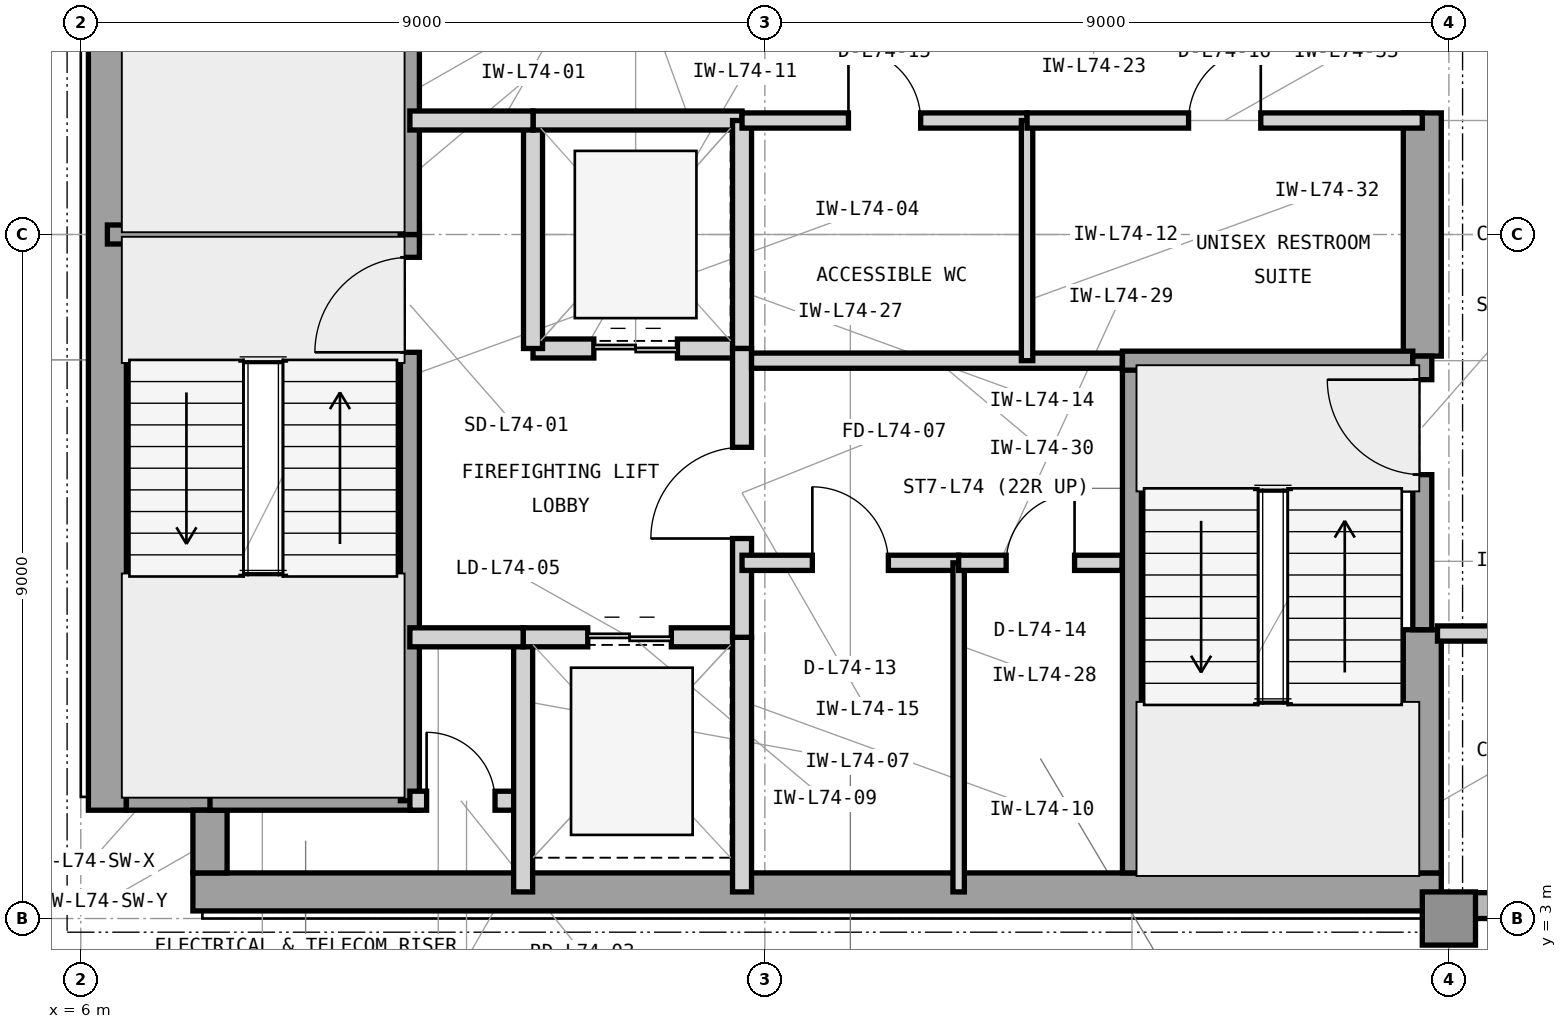
"""IFC4 building model, lengths in metres.
Left out: names, types, materials, properties, quantities, classifications, styles, units other than length and angle.
Written with IfcOpenShell. Run it as: python <this file> out.ifc"""

import sys

from ifc_helpers import new_model, si_unit, direction, frame, frame_2d, origin, origin_2d, place, context, subcontext, project, spatial, rectangle, extrude, element, fill, save


model = new_model("IFC4")
c1 = context("Model", 3, precision=1e-05, world=origin(), true_north=direction((0.0, 1.0)))
c2 = subcontext(c1, "Body", "Model", "MODEL_VIEW")
j1 = project(units=[si_unit("LENGTHUNIT", "METRE"), si_unit("PLANEANGLEUNIT", "RADIAN")], contexts=[c1])
p1 = place(None, origin())
s1 = spatial("IfcSite", under=j1, at=p1, CompositionType="ELEMENT")
p2 = place(p1, origin())
s2 = spatial("IfcBuilding", under=s1, at=p2, CompositionType="ELEMENT")
p3 = place(p2, frame((0.0, 0.0, 301.5)))
s3 = spatial("IfcBuildingStorey", under=s2, at=p3, CompositionType="ELEMENT", Elevation=301.5)
p4 = place(p3, frame((7.475, 3.35, 0.0), z_axis=(0.0, 0.0, 1.0), x_axis=(1.0, 0.0, 0.0)))
e1 = element("IfcWall", 1, at=p4, inside=s3, PredefinedType="SHEAR", context=c2, shape_type="SweptSolid", body=[
    extrude(rectangle(XDim=16.425, YDim=0.5, at=frame_2d((8.212, 0.0))), origin(), (0.0, 0.0, 1.0), 3.9),
])
p5 = place(p3, frame((6.35, 4.425, 0.0), z_axis=(0.0, 0.0, 1.0), x_axis=(0.0, 1.0, 0.0)))
e2 = element("IfcWall", 2, at=p5, inside=s3, PredefinedType="SHEAR", context=c2, shape_type="SweptSolid", body=[
    extrude(rectangle(XDim=15.15, YDim=0.5, at=frame_2d((7.575, 0.0))), origin(), (0.0, 0.0, 1.0), 3.9),
])
p6 = place(p3, frame((23.65, 3.6, 0.0), z_axis=(0.0, 0.0, 1.0), x_axis=(0.0, 1.0, 0.0)))
e3 = element("IfcWall", 3, at=p6, inside=s3, PredefinedType="SHEAR", context=c2, shape_type="SweptSolid", body=[
    extrude(rectangle(XDim=3.2, YDim=0.5, at=frame_2d((1.6, 0.0))), origin(), (0.0, 0.0, 1.0), 3.9),
])
p7 = place(p3, frame((23.65, 10.4, 0.0), z_axis=(0.0, 0.0, 1.0), x_axis=(0.0, 1.0, 0.0)))
e4 = element("IfcWall", 4, at=p7, inside=s3, PredefinedType="SHEAR", context=c2, shape_type="SweptSolid", body=[
    extrude(rectangle(XDim=3.2, YDim=0.5, at=frame_2d((1.6, 0.0))), origin(), (0.0, 0.0, 1.0), 3.9),
])
p8 = place(p3, frame((6.6, 4.65, 0.0), z_axis=(0.0, 0.0, 1.0), x_axis=(1.0, 0.0, 0.0)))
e5 = element("IfcWall", 5, at=p8, inside=s3, PredefinedType="SHEAR", context=c2, shape_type="SweptSolid", body=[
    extrude(rectangle(XDim=1.325, YDim=0.45, at=frame_2d((0.663, 0.0))), origin(), (0.0, 0.0, 1.0), 3.9),
])
p9 = place(p3, frame((7.7, 3.6, 0.0), z_axis=(0.0, 0.0, 1.0), x_axis=(0.0, 1.0, 0.0)))
e6 = element("IfcWall", 6, at=p9, inside=s3, PredefinedType="SHEAR", context=c2, shape_type="SweptSolid", body=[
    extrude(rectangle(XDim=0.825, YDim=0.45, at=frame_2d((0.413, 0.0))), origin(), (0.0, 0.0, 1.0), 3.9),
])
p10 = place(p3, frame((24.0, 3.0, 0.0), z_axis=(0.0, 0.0, 1.0), x_axis=(1.0, 0.0, 0.0)))
e7 = element("IfcColumn", 7, at=p10, inside=s3, PredefinedType="COLUMN", context=c2, shape_type="SweptSolid", body=[
    extrude(rectangle(XDim=0.7, YDim=0.7, at=origin_2d()), origin(), (0.0, 0.0, 1.0), 3.9),
])
p11 = place(p3, frame((23.9, 3.17, 0.0), z_axis=(0.0, 0.0, 1.0), x_axis=(1.0, 0.0, 0.0)))
e8 = element("IfcWall", 8, at=p11, inside=s3, PredefinedType="STANDARD", context=c2, shape_type="SweptSolid", body=[
    extrude(rectangle(XDim=25.5, YDim=0.34, at=frame_2d((12.75, 0.0))), origin(), (0.0, 0.0, 1.0), 3.715),
])
p12 = place(p11, frame((0.8, 0.0, 0.8)))
e9 = element("IfcOpeningElement", 9, at=p12, cuts=e8, PredefinedType="OPENING", context=c2, shape_type="SweptSolid", body=[
    extrude(rectangle(XDim=1.9, YDim=2.35, at=frame_2d((0.95, 1.175))), frame((0.0, 0.18, 0.0), z_axis=(0.0, -1.0, 0.0), x_axis=(1.0, 0.0, 0.0)), (0.0, 0.0, 1.0), 0.36),
])
p13 = place(p11, frame((10.075, 0.0, 0.8)))
e10 = element("IfcOpeningElement", 10, at=p13, cuts=e8, PredefinedType="OPENING", context=c2, shape_type="SweptSolid", body=[
    extrude(rectangle(XDim=2.6, YDim=2.35, at=frame_2d((1.3, 1.175))), frame((0.0, 0.18, 0.0), z_axis=(0.0, -1.0, 0.0), x_axis=(1.0, 0.0, 0.0)), (0.0, 0.0, 1.0), 0.36),
])
p14 = place(p11, frame((14.525, 0.0, 0.8)))
e11 = element("IfcOpeningElement", 11, at=p14, cuts=e8, PredefinedType="OPENING", context=c2, shape_type="SweptSolid", body=[
    extrude(rectangle(XDim=2.6, YDim=2.35, at=frame_2d((1.3, 1.175))), frame((0.0, 0.18, 0.0), z_axis=(0.0, -1.0, 0.0), x_axis=(1.0, 0.0, 0.0)), (0.0, 0.0, 1.0), 0.36),
])
p15 = place(p3, frame((6.35, 12.0, 0.0), z_axis=(0.0, 0.0, 1.0), x_axis=(1.0, 0.0, 0.0)))
e12 = element("IfcWall", 12, at=p15, inside=s3, PredefinedType="SHEAR", context=c2, shape_type="SweptSolid", body=[
    extrude(rectangle(XDim=4.105, YDim=0.25, at=frame_2d((2.052, 0.0))), origin(), (0.0, 0.0, 1.0), 3.9),
])
p16 = place(p3, frame((7.7, 4.55, 0.0), z_axis=(0.0, 0.0, 1.0), x_axis=(1.0, 0.0, 0.0)))
e13 = element("IfcWall", 13, at=p16, inside=s3, PredefinedType="SHEAR", context=c2, shape_type="SweptSolid", body=[
    extrude(rectangle(XDim=2.755, YDim=0.25, at=frame_2d((1.377, 0.0))), origin(), (0.0, 0.0, 1.0), 3.9),
])
p17 = place(p3, frame((10.33, 4.55, 0.0), z_axis=(0.0, 0.0, 1.0), x_axis=(0.0, 1.0, 0.0)))
e14 = element("IfcWall", 14, at=p17, inside=s3, PredefinedType="SHEAR", context=c2, shape_type="SweptSolid", body=[
    extrude(rectangle(XDim=7.45, YDim=0.25, at=frame_2d((3.725, 0.0))), origin(), (0.0, 0.0, 1.0), 3.9),
])
p18 = place(p17, frame((5.9, 0.0, 0.0)))
e15 = element("IfcOpeningElement", 15, at=p18, cuts=e14, PredefinedType="OPENING", context=c2, shape_type="SweptSolid", body=[
    extrude(rectangle(XDim=1.25, YDim=2.2, at=frame_2d((0.625, 1.1))), frame((0.0, 0.135, 0.0), z_axis=(0.0, -1.0, 0.0), x_axis=(1.0, 0.0, 0.0)), (0.0, 0.0, 1.0), 0.27),
])
p19 = place(p3, frame((10.33, 12.0, 0.0), z_axis=(0.0, 0.0, 1.0), x_axis=(0.0, 1.0, 0.0)))
e16 = element("IfcWall", 16, at=p19, inside=s3, PredefinedType="SHEAR", context=c2, shape_type="SweptSolid", body=[
    extrude(rectangle(XDim=7.45, YDim=0.25, at=frame_2d((3.725, 0.0))), origin(), (0.0, 0.0, 1.0), 3.9),
])
p20 = place(p19, frame((5.85, 0.0, 0.0)))
e17 = element("IfcOpeningElement", 17, at=p20, cuts=e16, PredefinedType="OPENING", context=c2, shape_type="SweptSolid", body=[
    extrude(rectangle(XDim=1.25, YDim=2.2, at=frame_2d((0.625, 1.1))), frame((0.0, 0.135, 0.0), z_axis=(0.0, -1.0, 0.0), x_axis=(1.0, 0.0, 0.0)), (0.0, 0.0, 1.0), 0.27),
])
p21 = place(p3, frame((10.33, 4.55, 0.0), z_axis=(0.0, 0.0, 1.0), x_axis=(1.0, 0.0, 0.0)))
e18 = element("IfcWall", 18, at=p21, inside=s3, PredefinedType="PARTITIONING", context=c2, shape_type="SweptSolid", body=[
    extrude(rectangle(XDim=1.49, YDim=0.25, at=frame_2d((0.745, 0.0))), origin(), (0.0, 0.0, 1.0), 3.705),
])
p22 = place(p21, frame((0.22, 0.0, 0.0)))
e19 = element("IfcOpeningElement", 19, at=p22, cuts=e18, PredefinedType="OPENING", context=c2, shape_type="SweptSolid", body=[
    extrude(rectangle(XDim=0.9, YDim=2.1, at=frame_2d((0.45, 1.05))), frame((0.0, 0.135, 0.0), z_axis=(0.0, -1.0, 0.0), x_axis=(1.0, 0.0, 0.0)), (0.0, 0.0, 1.0), 0.27),
])
p23 = place(p3, frame((11.82, 3.35, 0.0), z_axis=(0.0, 0.0, 1.0), x_axis=(0.0, 1.0, 0.0)))
e20 = element("IfcWall", 20, at=p23, inside=s3, PredefinedType="PARTITIONING", context=c2, shape_type="SweptSolid", body=[
    extrude(rectangle(XDim=3.35, YDim=0.25, at=frame_2d((1.675, 0.0))), origin(), (0.0, 0.0, 1.0), 3.705),
])
p24 = place(p3, frame((11.82, 6.7, 0.0), z_axis=(0.0, 0.0, 1.0), x_axis=(1.0, 0.0, 0.0)))
e21 = element("IfcWall", 21, at=p24, inside=s3, PredefinedType="PARTITIONING", context=c2, shape_type="SweptSolid", body=[
    extrude(rectangle(XDim=2.88, YDim=0.25, at=frame_2d((1.44, 0.0))), origin(), (0.0, 0.0, 1.0), 3.354),
])
p25 = place(p24, frame((0.85, 0.0, 0.0)))
e22 = element("IfcOpeningElement", 22, at=p25, cuts=e21, PredefinedType="OPENING", context=c2, shape_type="SweptSolid", body=[
    extrude(rectangle(XDim=1.1, YDim=2.25, at=frame_2d((0.55, 1.125))), frame((0.0, 0.135, 0.0), z_axis=(0.0, -1.0, 0.0), x_axis=(1.0, 0.0, 0.0)), (0.0, 0.0, 1.0), 0.27),
])
p26 = place(p3, frame((14.7, 3.35, 0.0), z_axis=(0.0, 0.0, 1.0), x_axis=(0.0, 1.0, 0.0)))
e23 = element("IfcWall", 23, at=p26, inside=s3, PredefinedType="PARTITIONING", context=c2, shape_type="SweptSolid", body=[
    extrude(rectangle(XDim=3.35, YDim=0.25, at=frame_2d((1.675, 0.0))), origin(), (0.0, 0.0, 1.0), 3.705),
])
p27 = place(p3, frame((11.95, 10.5, 0.0), z_axis=(0.0, 0.0, 1.0), x_axis=(1.0, 0.0, 0.0)))
e24 = element("IfcWall", 24, at=p27, inside=s3, PredefinedType="PARTITIONING", context=c2, shape_type="SweptSolid", body=[
    extrude(rectangle(XDim=2.75, YDim=0.25, at=frame_2d((1.375, 0.0))), origin(), (0.0, 0.0, 1.0), 3.354),
])
p28 = place(p27, frame((0.8, 0.0, 0.0)))
e25 = element("IfcOpeningElement", 25, at=p28, cuts=e24, PredefinedType="OPENING", context=c2, shape_type="SweptSolid", body=[
    extrude(rectangle(XDim=1.1, YDim=2.25, at=frame_2d((0.55, 1.125))), frame((0.0, 0.135, 0.0), z_axis=(0.0, -1.0, 0.0), x_axis=(1.0, 0.0, 0.0)), (0.0, 0.0, 1.0), 0.27),
])
p29 = place(p3, frame((11.95, 10.5, 0.0), z_axis=(0.0, 0.0, 1.0), x_axis=(0.0, 1.0, 0.0)))
e26 = element("IfcWall", 26, at=p29, inside=s3, PredefinedType="PARTITIONING", context=c2, shape_type="SweptSolid", body=[
    extrude(rectangle(XDim=3.0, YDim=0.25, at=frame_2d((1.5, 0.0))), origin(), (0.0, 0.0, 1.0), 3.705),
])
p30 = place(p3, frame((11.95, 13.5, 0.0), z_axis=(0.0, 0.0, 1.0), x_axis=(1.0, 0.0, 0.0)))
e27 = element("IfcWall", 27, at=p30, inside=s3, PredefinedType="PARTITIONING", context=c2, shape_type="SweptSolid", body=[
    extrude(rectangle(XDim=2.75, YDim=0.25, at=frame_2d((1.375, 0.0))), origin(), (0.0, 0.0, 1.0), 3.354),
])
p31 = place(p3, frame((14.7, 10.5, 0.0), z_axis=(0.0, 0.0, 1.0), x_axis=(0.0, 1.0, 0.0)))
e28 = element("IfcWall", 28, at=p31, inside=s3, PredefinedType="PARTITIONING", context=c2, shape_type="SweptSolid", body=[
    extrude(rectangle(XDim=3.0, YDim=0.25, at=frame_2d((1.5, 0.0))), origin(), (0.0, 0.0, 1.0), 3.705),
])
p32 = place(p3, frame((14.7, 6.7, 0.0), z_axis=(0.0, 0.0, 1.0), x_axis=(0.0, 1.0, 0.0)))
e29 = element("IfcWall", 29, at=p32, inside=s3, PredefinedType="PARTITIONING", context=c2, shape_type="SweptSolid", body=[
    extrude(rectangle(XDim=3.8, YDim=0.25, at=frame_2d((1.9, 0.0))), origin(), (0.0, 0.0, 1.0), 3.705),
])
p33 = place(p32, frame((1.3, 0.0, 0.0)))
e30 = element("IfcOpeningElement", 30, at=p33, cuts=e29, PredefinedType="OPENING", context=c2, shape_type="SweptSolid", body=[
    extrude(rectangle(XDim=1.2, YDim=2.2, at=frame_2d((0.6, 1.1))), frame((0.0, 0.135, 0.0), z_axis=(0.0, -1.0, 0.0), x_axis=(1.0, 0.0, 0.0)), (0.0, 0.0, 1.0), 0.27),
])
p34 = place(p3, frame((10.33, 13.5, 0.0), z_axis=(0.0, 0.0, 1.0), x_axis=(1.0, 0.0, 0.0)))
e31 = element("IfcWall", 31, at=p34, inside=s3, PredefinedType="PARTITIONING", context=c2, shape_type="SweptSolid", body=[
    extrude(rectangle(XDim=1.62, YDim=0.25, at=frame_2d((0.81, 0.0))), origin(), (0.0, 0.0, 1.0), 3.354),
])
p35 = place(p3, frame((10.33, 6.7, 0.0), z_axis=(0.0, 0.0, 1.0), x_axis=(1.0, 0.0, 0.0)))
e32 = element("IfcWall", 32, at=p35, inside=s3, PredefinedType="PARTITIONING", context=c2, shape_type="SweptSolid", body=[
    extrude(rectangle(XDim=1.49, YDim=0.25, at=frame_2d((0.745, 0.0))), origin(), (0.0, 0.0, 1.0), 3.354),
])
p36 = place(p3, frame((14.7, 7.68, 0.0), z_axis=(0.0, 0.0, 1.0), x_axis=(1.0, 0.0, 0.0)))
e33 = element("IfcWall", 33, at=p36, inside=s3, PredefinedType="PARTITIONING", context=c2, shape_type="SweptSolid", body=[
    extrude(rectangle(XDim=2.85, YDim=0.2, at=frame_2d((1.425, 0.0))), origin(), (0.0, 0.0, 1.0), 3.705),
])
p37 = place(p36, frame((0.925, 0.0, 0.0)))
e34 = element("IfcOpeningElement", 34, at=p37, cuts=e33, PredefinedType="OPENING", context=c2, shape_type="SweptSolid", body=[
    extrude(rectangle(XDim=1.0, YDim=2.15, at=frame_2d((0.5, 1.075))), frame((0.0, 0.11, 0.0), z_axis=(0.0, -1.0, 0.0), x_axis=(1.0, 0.0, 0.0)), (0.0, 0.0, 1.0), 0.22),
])
p38 = place(p3, frame((17.55, 3.35, 0.0), z_axis=(0.0, 0.0, 1.0), x_axis=(0.0, 1.0, 0.0)))
e35 = element("IfcWall", 35, at=p38, inside=s3, PredefinedType="PARTITIONING", context=c2, shape_type="SweptSolid", body=[
    extrude(rectangle(XDim=4.33, YDim=0.15, at=frame_2d((2.165, 0.0))), origin(), (0.0, 0.0, 1.0), 3.705),
])
p39 = place(p3, frame((17.55, 7.68, 0.0), z_axis=(0.0, 0.0, 1.0), x_axis=(1.0, 0.0, 0.0)))
e36 = element("IfcWall", 36, at=p39, inside=s3, PredefinedType="PARTITIONING", context=c2, shape_type="SweptSolid", body=[
    extrude(rectangle(XDim=2.15, YDim=0.2, at=frame_2d((1.075, 0.0))), origin(), (0.0, 0.0, 1.0), 3.705),
])
p40 = place(p39, frame((0.625, 0.0, 0.0)))
e37 = element("IfcOpeningElement", 37, at=p40, cuts=e36, PredefinedType="OPENING", context=c2, shape_type="SweptSolid", body=[
    extrude(rectangle(XDim=0.9, YDim=2.1, at=frame_2d((0.45, 1.05))), frame((0.0, 0.11, 0.0), z_axis=(0.0, -1.0, 0.0), x_axis=(1.0, 0.0, 0.0)), (0.0, 0.0, 1.0), 0.22),
])
p41 = place(p3, frame((14.825, 10.34, 0.0), z_axis=(0.0, 0.0, 1.0), x_axis=(1.0, 0.0, 0.0)))
e38 = element("IfcWall", 38, at=p41, inside=s3, PredefinedType="PARTITIONING", context=c2, shape_type="SweptSolid", body=[
    extrude(rectangle(XDim=4.88, YDim=0.2, at=frame_2d((2.44, 0.0))), origin(), (0.0, 0.0, 1.0), 3.705),
])
p42 = place(p3, frame((14.7, 13.5, 0.0), z_axis=(0.0, 0.0, 1.0), x_axis=(1.0, 0.0, 0.0)))
e39 = element("IfcWall", 39, at=p42, inside=s3, PredefinedType="PARTITIONING", context=c2, shape_type="SweptSolid", body=[
    extrude(rectangle(XDim=3.75, YDim=0.2, at=frame_2d((1.875, 0.0))), origin(), (0.0, 0.0, 1.0), 3.354),
])
p43 = place(p42, frame((1.4, 0.0, 0.0)))
e40 = element("IfcOpeningElement", 40, at=p43, cuts=e39, PredefinedType="OPENING", context=c2, shape_type="SweptSolid", body=[
    extrude(rectangle(XDim=0.95, YDim=2.1, at=frame_2d((0.475, 1.05))), frame((0.0, 0.11, 0.0), z_axis=(0.0, -1.0, 0.0), x_axis=(1.0, 0.0, 0.0)), (0.0, 0.0, 1.0), 0.22),
])
p44 = place(p3, frame((18.45, 10.34, 0.0), z_axis=(0.0, 0.0, 1.0), x_axis=(0.0, 1.0, 0.0)))
e41 = element("IfcWall", 41, at=p44, inside=s3, PredefinedType="PARTITIONING", context=c2, shape_type="SweptSolid", body=[
    extrude(rectangle(XDim=3.16, YDim=0.15, at=frame_2d((1.58, 0.0))), origin(), (0.0, 0.0, 1.0), 3.705),
])
p45 = place(p3, frame((18.45, 13.5, 0.0), z_axis=(0.0, 0.0, 1.0), x_axis=(1.0, 0.0, 0.0)))
e42 = element("IfcWall", 42, at=p45, inside=s3, PredefinedType="PARTITIONING", context=c2, shape_type="SweptSolid", body=[
    extrude(rectangle(XDim=5.2, YDim=0.2, at=frame_2d((2.6, 0.0))), origin(), (0.0, 0.0, 1.0), 3.354),
])
p46 = place(p45, frame((2.125, 0.0, 0.0)))
e43 = element("IfcOpeningElement", 43, at=p46, cuts=e42, PredefinedType="OPENING", context=c2, shape_type="SweptSolid", body=[
    extrude(rectangle(XDim=0.95, YDim=2.1, at=frame_2d((0.475, 1.05))), frame((0.0, 0.11, 0.0), z_axis=(0.0, -1.0, 0.0), x_axis=(1.0, 0.0, 0.0)), (0.0, 0.0, 1.0), 0.22),
])
p47 = place(p3, frame((23.85, 6.75, 0.0), z_axis=(0.0, 0.0, 1.0), x_axis=(1.0, 0.0, 0.0)))
e44 = element("IfcWall", 44, at=p47, inside=s3, PredefinedType="PARTITIONING", context=c2, shape_type="SweptSolid", body=[
    extrude(rectangle(XDim=3.05, YDim=0.2, at=frame_2d((1.525, 0.0))), origin(), (0.0, 0.0, 1.0), 3.705),
])
p48 = place(p47, frame((0.9, 0.0, 0.0)))
e45 = element("IfcOpeningElement", 45, at=p48, cuts=e44, PredefinedType="OPENING", context=c2, shape_type="SweptSolid", body=[
    extrude(rectangle(XDim=1.0, YDim=2.15, at=frame_2d((0.5, 1.075))), frame((0.0, 0.11, 0.0), z_axis=(0.0, -1.0, 0.0), x_axis=(1.0, 0.0, 0.0)), (0.0, 0.0, 1.0), 0.22),
])
p49 = place(p3, frame((19.83, 3.6, 0.0), z_axis=(0.0, 0.0, 1.0), x_axis=(0.0, 1.0, 0.0)))
e46 = element("IfcWall", 46, at=p49, inside=s3, PredefinedType="SHEAR", context=c2, shape_type="SweptSolid", body=[
    extrude(rectangle(XDim=6.74, YDim=0.25, at=frame_2d((3.37, 0.0))), origin(), (0.0, 0.0, 1.0), 3.9),
])
p50 = place(p3, frame((19.705, 10.34, 0.0), z_axis=(0.0, 0.0, 1.0), x_axis=(1.0, 0.0, 0.0)))
e47 = element("IfcWall", 47, at=p50, inside=s3, PredefinedType="SHEAR", context=c2, shape_type="SweptSolid", body=[
    extrude(rectangle(XDim=3.82, YDim=0.25, at=frame_2d((1.91, 0.0))), origin(), (0.0, 0.0, 1.0), 3.9),
])
p51 = place(p3, frame((23.65, 6.8, 0.0), z_axis=(0.0, 0.0, 1.0), x_axis=(0.0, 1.0, 0.0)))
e48 = element("IfcWall", 48, at=p51, inside=s3, PredefinedType="SHEAR", context=c2, shape_type="SweptSolid", body=[
    extrude(rectangle(XDim=3.6, YDim=0.25, at=frame_2d((1.8, 0.0))), origin(), (0.0, 0.0, 1.0), 3.9),
])
p52 = place(p51, frame((2.04, 0.0, 0.0)))
e49 = element("IfcOpeningElement", 49, at=p52, cuts=e48, PredefinedType="OPENING", context=c2, shape_type="SweptSolid", body=[
    extrude(rectangle(XDim=1.25, YDim=2.2, at=frame_2d((0.625, 1.1))), frame((0.0, 0.135, 0.0), z_axis=(0.0, -1.0, 0.0), x_axis=(1.0, 0.0, 0.0)), (0.0, 0.0, 1.0), 0.27),
])
p53 = place(p18, origin())
e50 = element("IfcDoor", 50, at=p53, inside=s3, OperationType="SINGLE_SWING_LEFT", PredefinedType="DOOR", context=c2, shape_type="SweptSolid", body=[
    extrude(rectangle(XDim=1.25, YDim=2.2, at=frame_2d((0.625, 1.1))), frame((0.0, 0.025, 0.0), z_axis=(0.0, -1.0, 0.0), x_axis=(1.0, 0.0, 0.0)), (0.0, 0.0, 1.0), 0.05),
])
fill(e15, e50)
p54 = place(p22, origin())
e51 = element("IfcDoor", 51, at=p54, inside=s3, OperationType="SINGLE_SWING_LEFT", PredefinedType="TRAPDOOR", context=c2, shape_type="SweptSolid", body=[
    extrude(rectangle(XDim=0.9, YDim=2.1, at=frame_2d((0.45, 1.05))), frame((0.0, 0.025, 0.0), z_axis=(0.0, -1.0, 0.0), x_axis=(1.0, 0.0, 0.0)), (0.0, 0.0, 1.0), 0.05),
])
fill(e19, e51)
p55 = place(p25, origin())
e52 = element("IfcDoor", 52, at=p55, inside=s3, OperationType="DOUBLE_DOOR_SLIDING", PredefinedType="DOOR", context=c2, shape_type="SweptSolid", body=[
    extrude(rectangle(XDim=1.1, YDim=2.25, at=frame_2d((0.55, 1.125))), frame((0.0, 0.025, 0.0), z_axis=(0.0, -1.0, 0.0), x_axis=(1.0, 0.0, 0.0)), (0.0, 0.0, 1.0), 0.05),
])
fill(e22, e52)
p56 = place(p28, origin())
e53 = element("IfcDoor", 53, at=p56, inside=s3, OperationType="DOUBLE_DOOR_SLIDING", PredefinedType="DOOR", context=c2, shape_type="SweptSolid", body=[
    extrude(rectangle(XDim=1.1, YDim=2.25, at=frame_2d((0.55, 1.125))), frame((0.0, 0.025, 0.0), z_axis=(0.0, -1.0, 0.0), x_axis=(1.0, 0.0, 0.0)), (0.0, 0.0, 1.0), 0.05),
])
fill(e25, e53)
p57 = place(p33, origin())
e54 = element("IfcDoor", 54, at=p57, inside=s3, OperationType="SINGLE_SWING_LEFT", PredefinedType="DOOR", context=c2, shape_type="SweptSolid", body=[
    extrude(rectangle(XDim=1.2, YDim=2.2, at=frame_2d((0.6, 1.1))), frame((0.0, 0.025, 0.0), z_axis=(0.0, -1.0, 0.0), x_axis=(1.0, 0.0, 0.0)), (0.0, 0.0, 1.0), 0.05),
])
fill(e30, e54)
p58 = place(p37, origin())
e55 = element("IfcDoor", 55, at=p58, inside=s3, OperationType="SINGLE_SWING_LEFT", PredefinedType="DOOR", context=c2, shape_type="SweptSolid", body=[
    extrude(rectangle(XDim=1.0, YDim=2.15, at=frame_2d((0.5, 1.075))), frame((0.0, 0.025, 0.0), z_axis=(0.0, -1.0, 0.0), x_axis=(1.0, 0.0, 0.0)), (0.0, 0.0, 1.0), 0.05),
])
fill(e34, e55)
p59 = place(p40, origin())
e56 = element("IfcDoor", 56, at=p59, inside=s3, OperationType="SINGLE_SWING_RIGHT", PredefinedType="TRAPDOOR", context=c2, shape_type="SweptSolid", body=[
    extrude(rectangle(XDim=0.9, YDim=2.1, at=frame_2d((0.45, 1.05))), frame((0.0, 0.025, 0.0), z_axis=(0.0, -1.0, 0.0), x_axis=(1.0, 0.0, 0.0)), (0.0, 0.0, 1.0), 0.05),
])
fill(e37, e56)
p60 = place(p43, origin())
e57 = element("IfcDoor", 57, at=p60, inside=s3, OperationType="SINGLE_SWING_LEFT", PredefinedType="DOOR", context=c2, shape_type="SweptSolid", body=[
    extrude(rectangle(XDim=0.95, YDim=2.1, at=frame_2d((0.475, 1.05))), frame((0.0, 0.025, 0.0), z_axis=(0.0, -1.0, 0.0), x_axis=(1.0, 0.0, 0.0)), (0.0, 0.0, 1.0), 0.05),
])
fill(e40, e57)
p61 = place(p46, origin())
e58 = element("IfcDoor", 58, at=p61, inside=s3, OperationType="SINGLE_SWING_RIGHT", PredefinedType="DOOR", context=c2, shape_type="SweptSolid", body=[
    extrude(rectangle(XDim=0.95, YDim=2.1, at=frame_2d((0.475, 1.05))), frame((0.0, 0.025, 0.0), z_axis=(0.0, -1.0, 0.0), x_axis=(1.0, 0.0, 0.0)), (0.0, 0.0, 1.0), 0.05),
])
fill(e43, e58)
p62 = place(p52, origin())
e59 = element("IfcDoor", 59, at=p62, inside=s3, OperationType="SINGLE_SWING_RIGHT", PredefinedType="DOOR", context=c2, shape_type="SweptSolid", body=[
    extrude(rectangle(XDim=1.25, YDim=2.2, at=frame_2d((0.625, 1.1))), frame((0.0, 0.025, 0.0), z_axis=(0.0, -1.0, 0.0), x_axis=(1.0, 0.0, 0.0)), (0.0, 0.0, 1.0), 0.05),
])
fill(e49, e59)
save(model, sys.argv[1])
